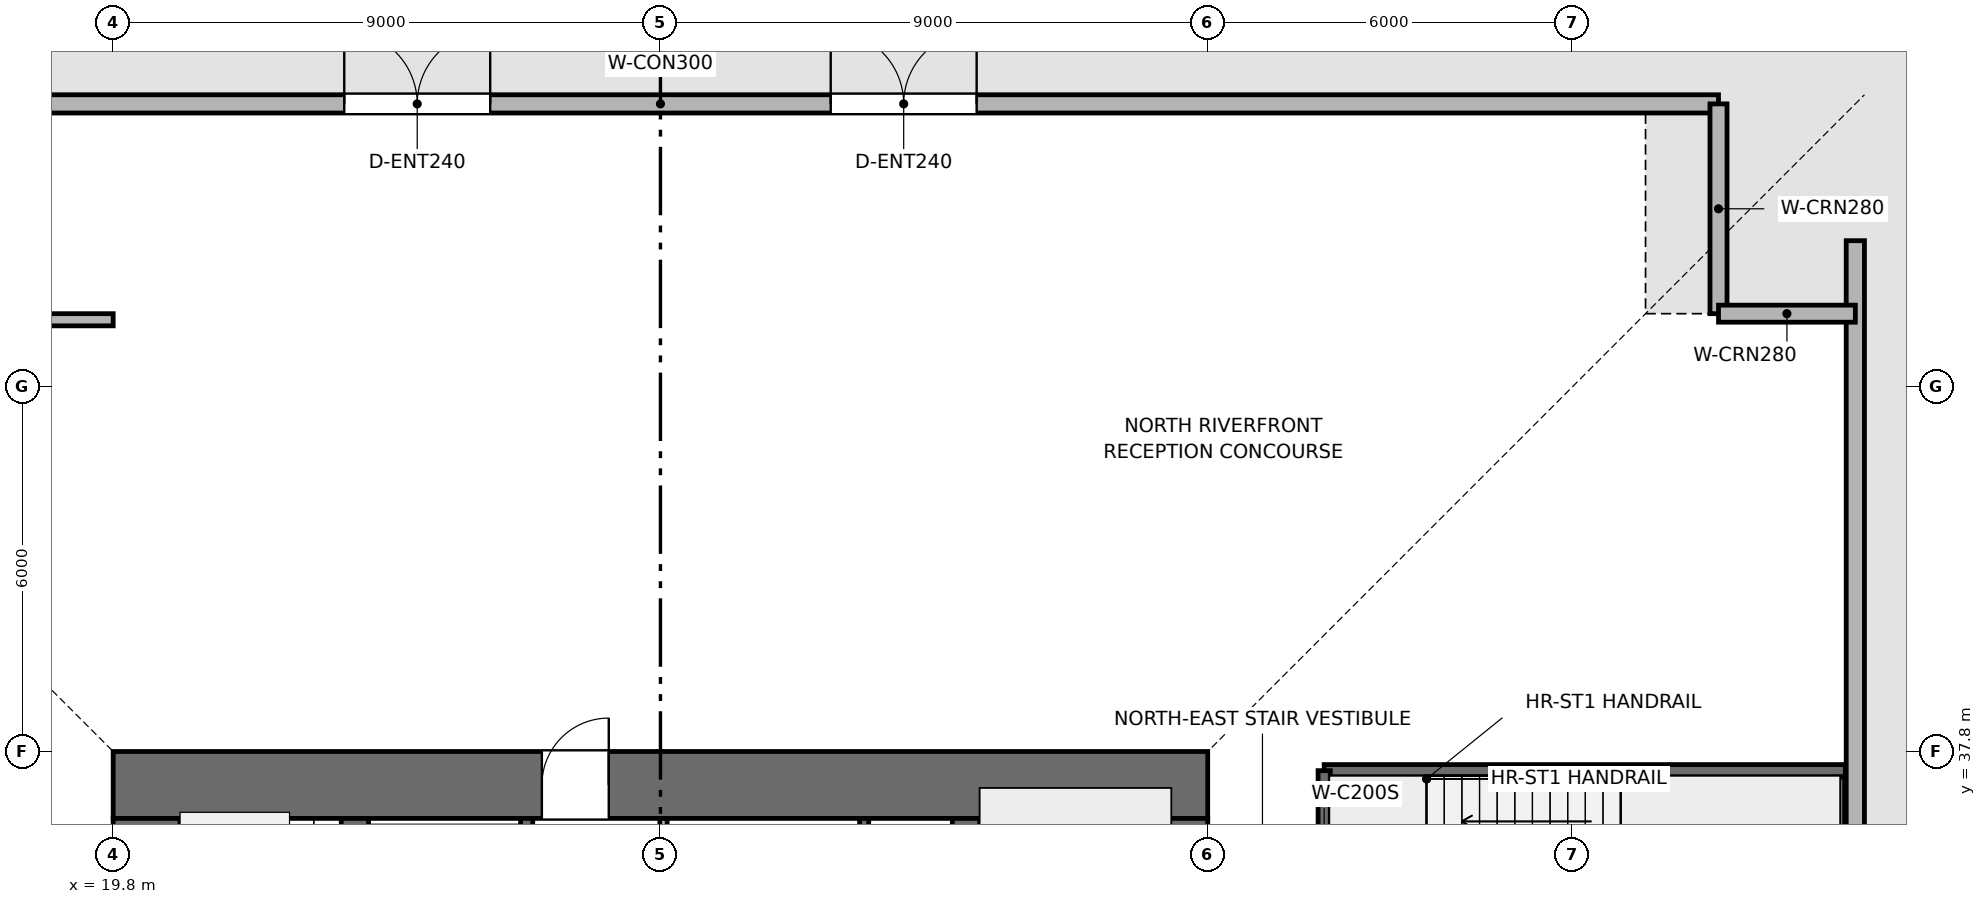
"""IFC4 building model, lengths in metres.
Left out: names, types, materials, properties, quantities, classifications, styles, units other than length and angle.
Written with IfcOpenShell. Run it as: python <this file> out.ifc"""

import sys

from ifc_helpers import new_model, si_unit, direction, frame, frame_2d, origin, place, context, subcontext, project, spatial, rectangle, extrude, element, fill, save


model = new_model("IFC4")
c1 = context("Model", 3, precision=1e-05, world=origin(), true_north=direction((0.0, 1.0)))
c2 = subcontext(c1, "Body", "Model", "MODEL_VIEW")
j1 = project(units=[si_unit("LENGTHUNIT", "METRE"), si_unit("PLANEANGLEUNIT", "RADIAN")], contexts=[c1])
p1 = place(None, origin())
s1 = spatial("IfcSite", under=j1, at=p1, CompositionType="ELEMENT")
p2 = place(p1, origin())
s2 = spatial("IfcBuilding", under=s1, at=p2, CompositionType="ELEMENT")
p3 = place(p2, origin())
s3 = spatial("IfcBuildingStorey", under=s2, at=p3, CompositionType="ELEMENT", Elevation=0.0)
p4 = place(p3, frame((19.8, 37.25, 0.0), z_axis=(0.0, 0.0, 1.0), x_axis=(1.0, 0.0, 0.0)))
e1 = element("IfcWall", 1, at=p4, inside=s3, PredefinedType="SHEAR", context=c2, shape_type="SweptSolid", body=[
    extrude(rectangle(XDim=18.0, YDim=1.1, at=frame_2d((9.0, 0.0))), origin(), (0.0, 0.0, 1.0), 8.4),
])
p5 = place(p4, frame((7.05, 0.0, 0.0)))
e2 = element("IfcOpeningElement", 2, at=p5, cuts=e1, PredefinedType="OPENING", context=c2, shape_type="SweptSolid", body=[
    extrude(rectangle(XDim=1.1, YDim=2.15, at=frame_2d((0.55, 1.075))), frame((0.0, 0.56, 0.0), z_axis=(0.0, -1.0, 0.0), x_axis=(1.0, 0.0, 0.0)), (0.0, 0.0, 1.0), 1.12),
])
p6 = place(p3, frame((20.35, 20.9, 0.0), z_axis=(0.0, 0.0, 1.0), x_axis=(0.0, 1.0, 0.0)))
e3 = element("IfcWall", 3, at=p6, inside=s3, PredefinedType="SHEAR", context=c2, shape_type="SweptSolid", body=[
    extrude(rectangle(XDim=15.8, YDim=1.1, at=frame_2d((7.9, 0.0))), origin(), (0.0, 0.0, 1.0), 8.4),
])
p7 = place(p6, frame((9.9, 0.0, 0.0)))
e4 = element("IfcOpeningElement", 4, at=p7, cuts=e3, PredefinedType="OPENING", context=c2, shape_type="SweptSolid", body=[
    extrude(rectangle(XDim=1.1, YDim=2.15, at=frame_2d((0.55, 1.075))), frame((0.0, 0.56, 0.0), z_axis=(0.0, -1.0, 0.0), x_axis=(1.0, 0.0, 0.0)), (0.0, 0.0, 1.0), 1.12),
])
p8 = place(p3, frame((37.25, 20.9, 0.0), z_axis=(0.0, 0.0, 1.0), x_axis=(0.0, 1.0, 0.0)))
e5 = element("IfcWall", 5, at=p8, inside=s3, PredefinedType="SHEAR", context=c2, shape_type="SweptSolid", body=[
    extrude(rectangle(XDim=15.8, YDim=1.1, at=frame_2d((7.9, 0.0))), origin(), (0.0, 0.0, 1.0), 8.4),
])
p9 = place(p8, frame((4.4, 0.0, 0.0)))
e6 = element("IfcOpeningElement", 6, at=p9, cuts=e5, PredefinedType="OPENING", context=c2, shape_type="SweptSolid", body=[
    extrude(rectangle(XDim=1.1, YDim=2.15, at=frame_2d((0.55, 1.075))), frame((0.0, 0.56, 0.0), z_axis=(0.0, -1.0, 0.0), x_axis=(1.0, 0.0, 0.0)), (0.0, 0.0, 1.0), 1.12),
])
for number, where, z_axis, x_axis in (
    (7, (23.775, 20.9, 0.0), (0.0, 0.0, 1.0), (0.0, 1.0, 0.0)),
    (8, (33.825, 20.9, 0.0), (0.0, 0.0, 1.0), (0.0, 1.0, 0.0)),
):
    element("IfcWall", number, at=place(p3, frame(where, z_axis=z_axis, x_axis=x_axis)), inside=s3, PredefinedType="SHEAR", context=c2, shape_type="SweptSolid", body=[
        extrude(rectangle(XDim=15.8, YDim=0.45, at=frame_2d((7.9, 0.0))), origin(), (0.0, 0.0, 1.0), 8.4),
    ])
p10 = place(p3, frame((11.4, 48.45, 0.0), z_axis=(0.0, 0.0, 1.0), x_axis=(1.0, 0.0, 0.0)))
e9 = element("IfcWall", 9, at=p10, inside=s3, PredefinedType="SOLIDWALL", context=c2, shape_type="SweptSolid", body=[
    extrude(rectangle(XDim=34.8, YDim=0.3, at=frame_2d((17.4, 0.0))), origin(), (0.0, 0.0, 1.0), 8.05),
])
p11 = place(p10, frame((12.2, 0.0, 0.0)))
e10 = element("IfcOpeningElement", 10, at=p11, cuts=e9, PredefinedType="OPENING", context=c2, shape_type="SweptSolid", body=[
    extrude(rectangle(XDim=2.4, YDim=2.6, at=frame_2d((1.2, 1.3))), frame((0.0, 0.16, 0.0), z_axis=(0.0, -1.0, 0.0), x_axis=(1.0, 0.0, 0.0)), (0.0, 0.0, 1.0), 0.32),
])
p12 = place(p10, frame((20.2, 0.0, 0.0)))
e11 = element("IfcOpeningElement", 11, at=p12, cuts=e9, PredefinedType="OPENING", context=c2, shape_type="SweptSolid", body=[
    extrude(rectangle(XDim=2.4, YDim=2.6, at=frame_2d((1.2, 1.3))), frame((0.0, 0.16, 0.0), z_axis=(0.0, -1.0, 0.0), x_axis=(1.0, 0.0, 0.0)), (0.0, 0.0, 1.0), 0.32),
])
p13 = place(p3, frame((48.45, 46.2, 0.0), z_axis=(0.0, 0.0, 1.0), x_axis=(0.0, -1.0, 0.0)))
e12 = element("IfcWall", 12, at=p13, inside=s3, PredefinedType="SOLIDWALL", context=c2, shape_type="SweptSolid", body=[
    extrude(rectangle(XDim=34.8, YDim=0.3, at=frame_2d((17.4, 0.0))), origin(), (0.0, 0.0, 1.0), 8.05),
])
p14 = place(p13, frame((16.4, 0.0, 0.0)))
e13 = element("IfcOpeningElement", 13, at=p14, cuts=e12, PredefinedType="OPENING", context=c2, shape_type="SweptSolid", body=[
    extrude(rectangle(XDim=2.0, YDim=2.4, at=frame_2d((1.0, 1.2))), frame((0.0, 0.16, 0.0), z_axis=(0.0, -1.0, 0.0), x_axis=(1.0, 0.0, 0.0)), (0.0, 0.0, 1.0), 0.32),
])
p15 = place(p3, frame((46.2, 48.45, 0.0), z_axis=(0.0, 0.0, 1.0), x_axis=(0.0, -1.0, 0.0)))
e14 = element("IfcWall", 14, at=p15, inside=s3, PredefinedType="SOLIDWALL", context=c2, shape_type="SweptSolid", body=[
    extrude(rectangle(XDim=3.45, YDim=0.28, at=frame_2d((1.725, 0.0))), origin(), (0.0, 0.0, 1.0), 8.05),
])
p16 = place(p3, frame((46.2, 45.0, 0.0), z_axis=(0.0, 0.0, 1.0), x_axis=(1.0, 0.0, 0.0)))
e15 = element("IfcWall", 15, at=p16, inside=s3, PredefinedType="SOLIDWALL", context=c2, shape_type="SweptSolid", body=[
    extrude(rectangle(XDim=2.25, YDim=0.28, at=frame_2d((1.125, 0.0))), origin(), (0.0, 0.0, 1.0), 8.05),
])
p17 = place(p3, frame((32.15, 34.0, 0.0), z_axis=(0.0, 0.0, 1.0), x_axis=(0.0, 1.0, 0.0)))
e16 = element("IfcWall", 16, at=p17, inside=s3, PredefinedType="SHEAR", context=c2, shape_type="SweptSolid", body=[
    extrude(rectangle(XDim=2.7, YDim=0.15, at=frame_2d((1.35, 0.0))), origin(), (0.0, 0.0, 1.0), 8.05),
])
p18 = place(p3, frame((26.6, 34.0, 0.0), z_axis=(0.0, 0.0, 1.0), x_axis=(0.0, 1.0, 0.0)))
e17 = element("IfcWall", 17, at=p18, inside=s3, PredefinedType="SHEAR", context=c2, shape_type="SweptSolid", body=[
    extrude(rectangle(XDim=2.7, YDim=0.2, at=frame_2d((1.35, 0.0))), origin(), (0.0, 0.0, 1.0), 8.05),
])
p19 = place(p18, frame((0.75, 0.0, 0.0)))
e18 = element("IfcOpeningElement", 18, at=p19, cuts=e17, PredefinedType="OPENING", context=c2, shape_type="SweptSolid", body=[
    extrude(rectangle(XDim=1.1, YDim=2.15, at=frame_2d((0.55, 1.075))), frame((0.0, 0.11, 0.0), z_axis=(0.0, -1.0, 0.0), x_axis=(1.0, 0.0, 0.0)), (0.0, 0.0, 1.0), 0.22),
])
p20 = place(p3, frame((39.715, 37.485, 0.0), z_axis=(0.0, 0.0, 1.0), x_axis=(1.0, 0.0, 0.0)))
e19 = element("IfcWall", 19, at=p20, inside=s3, PredefinedType="SHEAR", context=c2, shape_type="SweptSolid", body=[
    extrude(rectangle(XDim=8.57, YDim=0.2, at=frame_2d((4.285, 0.0))), origin(), (0.0, 0.0, 1.0), 8.398),
])
p21 = place(p3, frame((48.2, 34.27, 0.0), z_axis=(0.0, 0.0, 1.0), x_axis=(0.0, 1.0, 0.0)))
e20 = element("IfcWall", 20, at=p21, inside=s3, PredefinedType="SHEAR", context=c2, shape_type="SweptSolid", body=[
    extrude(rectangle(XDim=3.11, YDim=0.15, at=frame_2d((1.555, 0.0))), origin(), (0.0, 0.0, 1.0), 8.398),
])
p22 = place(p3, frame((39.715, 34.165, 0.0), z_axis=(0.0, 0.0, 1.0), x_axis=(0.0, 1.0, 0.0)))
e21 = element("IfcWall", 21, at=p22, inside=s3, PredefinedType="SHEAR", context=c2, shape_type="SweptSolid", body=[
    extrude(rectangle(XDim=3.32, YDim=0.2, at=frame_2d((1.66, 0.0))), origin(), (0.0, 0.0, 1.0), 8.398),
])
p23 = place(p3, frame((28.85, 33.925, 0.0), z_axis=(0.0, 0.0, 1.0), x_axis=(0.0, 1.0, 0.0)))
e22 = element("IfcWall", 22, at=p23, inside=s3, PredefinedType="PARTITIONING", context=c2, shape_type="SweptSolid", body=[
    extrude(rectangle(XDim=2.775, YDim=0.12, at=frame_2d((1.387, 0.0))), origin(), (0.0, 0.0, 1.0), 8.05),
])
p24 = place(p23, frame((0.25, 0.0, 0.0)))
e23 = element("IfcOpeningElement", 23, at=p24, cuts=e22, PredefinedType="OPENING", context=c2, shape_type="SweptSolid", body=[
    extrude(rectangle(XDim=0.85, YDim=2.1, at=frame_2d((0.425, 1.05))), frame((0.0, 0.07, 0.0), z_axis=(0.0, -1.0, 0.0), x_axis=(1.0, 0.0, 0.0)), (0.0, 0.0, 1.0), 0.14),
])
p25 = place(p23, frame((1.545, 0.0, 0.0)))
e24 = element("IfcOpeningElement", 24, at=p25, cuts=e22, PredefinedType="OPENING", context=c2, shape_type="SweptSolid", body=[
    extrude(rectangle(XDim=0.85, YDim=2.1, at=frame_2d((0.425, 1.05))), frame((0.0, 0.07, 0.0), z_axis=(0.0, -1.0, 0.0), x_axis=(1.0, 0.0, 0.0)), (0.0, 0.0, 1.0), 0.14),
])
p26 = place(p3, frame((11.4, 44.9, 0.0), z_axis=(0.0, 0.0, 1.0), x_axis=(1.0, 0.0, 0.0)))
e25 = element("IfcWall", 25, at=p26, inside=s3, PredefinedType="PARTITIONING", context=c2, shape_type="SweptSolid", body=[
    extrude(rectangle(XDim=8.4, YDim=0.2, at=frame_2d((4.2, 0.0))), origin(), (0.0, 0.0, 1.0), 7.135),
])
p27 = place(p11, origin())
e26 = element("IfcDoor", 26, at=p27, inside=s3, OperationType="DOUBLE_DOOR_SINGLE_SWING", PredefinedType="DOOR", context=c2, shape_type="SweptSolid", body=[
    extrude(rectangle(XDim=2.4, YDim=2.6, at=frame_2d((1.2, 1.3))), frame((0.0, 0.025, 0.0), z_axis=(0.0, -1.0, 0.0), x_axis=(1.0, 0.0, 0.0)), (0.0, 0.0, 1.0), 0.05),
])
fill(e10, e26)
p28 = place(p12, origin())
e27 = element("IfcDoor", 27, at=p28, inside=s3, OperationType="DOUBLE_DOOR_SINGLE_SWING", PredefinedType="DOOR", context=c2, shape_type="SweptSolid", body=[
    extrude(rectangle(XDim=2.4, YDim=2.6, at=frame_2d((1.2, 1.3))), frame((0.0, 0.025, 0.0), z_axis=(0.0, -1.0, 0.0), x_axis=(1.0, 0.0, 0.0)), (0.0, 0.0, 1.0), 0.05),
])
fill(e11, e27)
p29 = place(p5, origin())
e28 = element("IfcDoor", 28, at=p29, inside=s3, OperationType="SINGLE_SWING_RIGHT", PredefinedType="DOOR", context=c2, shape_type="SweptSolid", body=[
    extrude(rectangle(XDim=1.1, YDim=2.15, at=frame_2d((0.55, 1.075))), frame((0.0, 0.025, 0.0), z_axis=(0.0, -1.0, 0.0), x_axis=(1.0, 0.0, 0.0)), (0.0, 0.0, 1.0), 0.05),
])
fill(e2, e28)
save(model, sys.argv[1])
